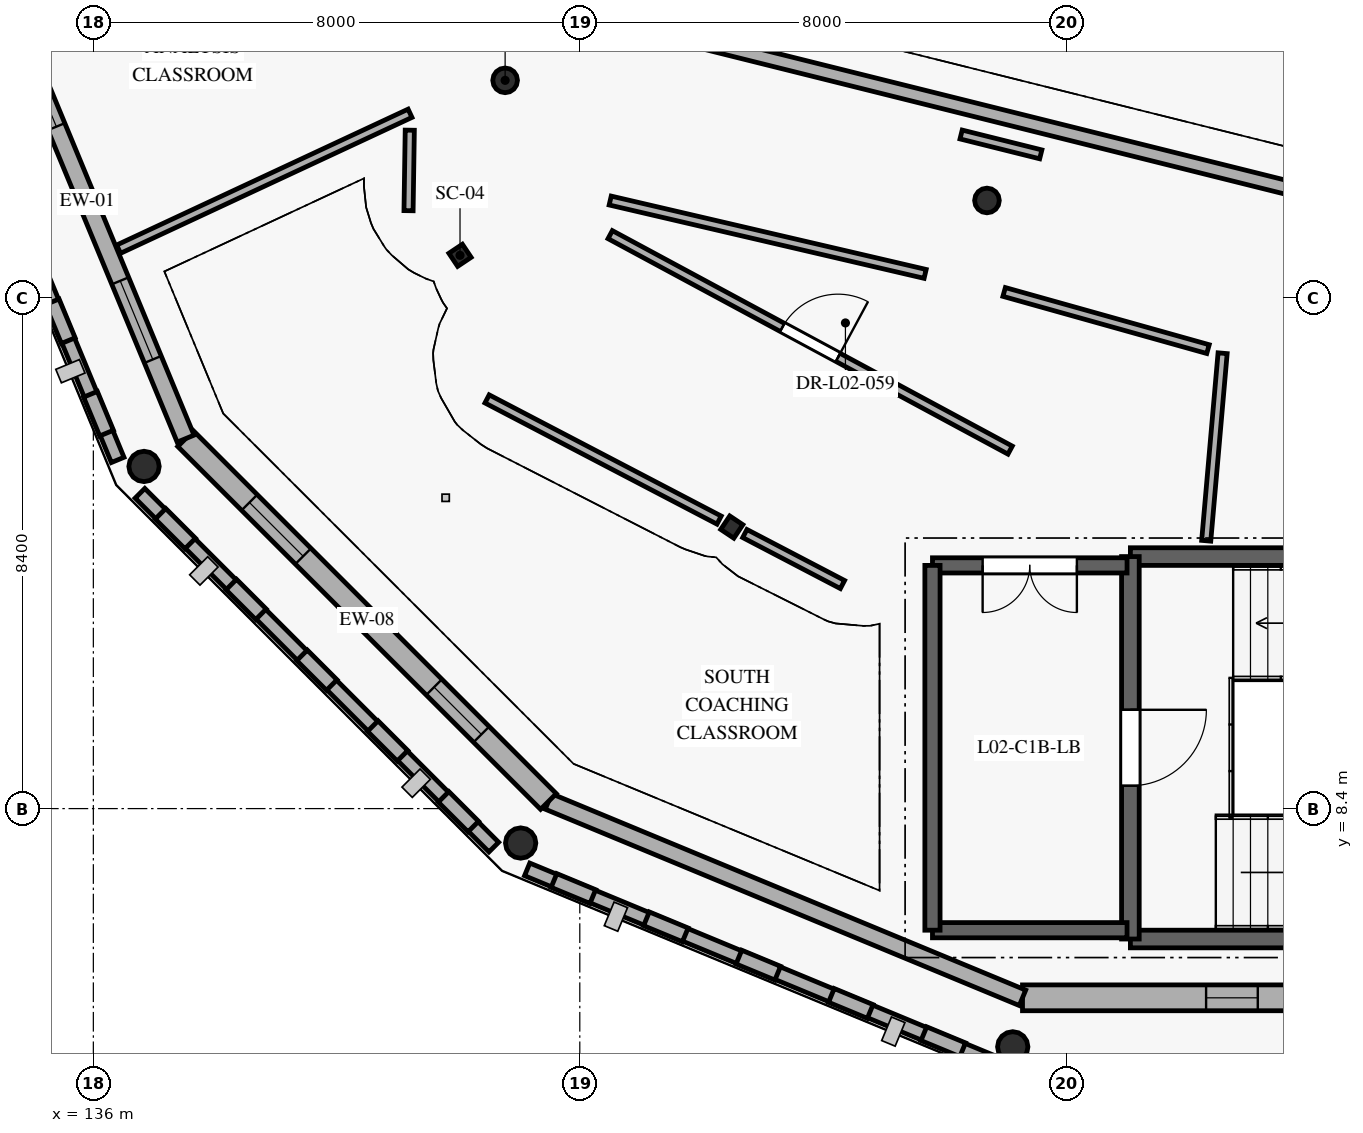
"""IFC4 building model, lengths in metres.
Left out: names, types, materials, properties, quantities, classifications, styles, units other than length and angle.
Written with IfcOpenShell. Run it as: python <this file> out.ifc"""

import sys

from ifc_helpers import new_model, si_unit, direction, frame, frame_2d, origin, origin_2d, place, context, subcontext, project, spatial, rectangle, circle, hollow_circle, i_section, extrude, element, fill, save


model = new_model("IFC4")
c1 = context("Model", 3, precision=1e-05, world=origin(), true_north=direction((0.0, 1.0)))
c2 = subcontext(c1, "Body", "Model", "MODEL_VIEW")
j1 = project(units=[si_unit("LENGTHUNIT", "METRE"), si_unit("PLANEANGLEUNIT", "RADIAN")], contexts=[c1])
p1 = place(None, origin())
s1 = spatial("IfcSite", under=j1, at=p1, CompositionType="ELEMENT")
p2 = place(p1, origin())
s2 = spatial("IfcBuilding", under=s1, at=p2, CompositionType="ELEMENT")
p3 = place(p2, frame((0.0, 0.0, 8.4)))
s3 = spatial("IfcBuildingStorey", under=s2, at=p3, CompositionType="ELEMENT", Elevation=8.4)
for number, where, z_axis, x_axis in (
    (1, (142.772, 20.377, 0.0), (0.0, 0.0, 1.0), (0.97, -0.242, 0.0)),
    (2, (150.696, 18.402, 0.0), (0.0, 0.0, 1.0), (0.97, -0.242, 0.0)),
):
    element("IfcColumn", number, at=place(p3, frame(where, z_axis=z_axis, x_axis=x_axis)), inside=s3, PredefinedType="COLUMN", context=c2, shape_type="SweptSolid", body=[
        extrude(hollow_circle(Radius=0.203, WallThickness=0.016, at=origin_2d()), origin(), (0.0, 0.0, 1.0), 4.2),
    ])
for number, where, z_axis, x_axis in (
    (3, (136.833, 14.027, 0.0), (0.0, 0.0, 1.0), (0.556, -0.831, 0.0)),
    (4, (143.027, 7.833, 0.0), (0.0, 0.0, 1.0), (0.831, -0.556, 0.0)),
    (5, (151.12, 4.481, 0.0), (0.0, 0.0, 1.0), (0.981, -0.195, 0.0)),
):
    element("IfcColumn", number, at=place(p3, frame(where, z_axis=z_axis, x_axis=x_axis)), inside=s3, PredefinedType="COLUMN", context=c2, shape_type="SweptSolid", body=[
        extrude(circle(Radius=0.25, at=origin_2d()), origin(), (0.0, 0.0, 1.0), 4.2),
    ])
for number, where, z_axis, x_axis in (
    (6, (142.03, 17.5, 0.0), (0.0, 0.0, 1.0), (0.556, -0.831, 0.0)),
    (7, (146.5, 13.03, 0.0), (0.0, 0.0, 1.0), (0.831, -0.556, 0.0)),
):
    element("IfcColumn", number, at=place(p3, frame(where, z_axis=z_axis, x_axis=x_axis)), inside=s3, PredefinedType="COLUMN", context=c2, shape_type="SweptSolid", body=[
        extrude(i_section(OverallWidth=0.259, OverallDepth=0.267, WebThickness=0.013, FlangeThickness=0.021, FilletRadius=0.013, at=origin_2d()), origin(), (0.0, 0.0, 1.0), 4.2),
    ])
p4 = place(p3, frame((159.719, 5.288, 0.0), z_axis=(0.0, 0.0, 1.0), x_axis=(-1.0, 0.0, 0.0)))
e8 = element("IfcWall", 8, at=p4, inside=s3, PredefinedType="SOLIDWALL", context=c2, shape_type="SweptSolid", body=[
    extrude(rectangle(XDim=8.438, YDim=0.425, at=frame_2d((4.219, 0.0))), origin(), (0.0, 0.0, 1.0), 3.94),
])
p5 = place(p4, frame((1.685, 0.0, 0.85)))
e9 = element("IfcOpeningElement", 9, at=p5, cuts=e8, PredefinedType="OPENING", context=c2, shape_type="SweptSolid", body=[
    extrude(rectangle(XDim=0.85, YDim=1.4, at=frame_2d((0.425, 0.7))), frame((0.0, 0.222, 0.0), z_axis=(0.0, -1.0, 0.0), x_axis=(1.0, 0.0, 0.0)), (0.0, 0.0, 1.0), 0.445),
])
p6 = place(p4, frame((4.569, 0.0, 0.85)))
e10 = element("IfcOpeningElement", 10, at=p6, cuts=e8, PredefinedType="OPENING", context=c2, shape_type="SweptSolid", body=[
    extrude(rectangle(XDim=0.85, YDim=1.4, at=frame_2d((0.425, 0.7))), frame((0.0, 0.222, 0.0), z_axis=(0.0, -1.0, 0.0), x_axis=(1.0, 0.0, 0.0)), (0.0, 0.0, 1.0), 0.445),
])
p7 = place(p3, frame((151.281, 5.288, 0.0), z_axis=(0.0, 0.0, 1.0), x_axis=(-0.923884604839, 0.382671186453, 0.0)))
e11 = element("IfcWall", 11, at=p7, inside=s3, PredefinedType="SOLIDWALL", context=c2, shape_type="SweptSolid", body=[
    extrude(rectangle(XDim=8.439, YDim=0.275, at=frame_2d((4.219, 0.0))), origin(), (0.0, 0.0, 1.0), 3.94),
])
p8 = place(p3, frame((143.484, 8.517, 0.0), z_axis=(0.0, 0.0, 1.0), x_axis=(-0.707106781187, 0.707106781187, 0.0)))
e12 = element("IfcWall", 12, at=p8, inside=s3, PredefinedType="SOLIDWALL", context=c2, shape_type="SweptSolid", body=[
    extrude(rectangle(XDim=8.439, YDim=0.365, at=frame_2d((4.219, 0.0))), origin(), (0.0, 0.0, 1.0), 3.94),
])
p9 = place(p8, frame((1.56, 0.0, 0.85)))
e13 = element("IfcOpeningElement", 13, at=p9, cuts=e12, PredefinedType="OPENING", context=c2, shape_type="SweptSolid", body=[
    extrude(rectangle(XDim=1.1, YDim=1.4, at=frame_2d((0.55, 0.7))), frame((0.0, 0.192, 0.0), z_axis=(0.0, -1.0, 0.0), x_axis=(1.0, 0.0, 0.0)), (0.0, 0.0, 1.0), 0.385),
])
p10 = place(p8, frame((5.704, 0.0, 0.85)))
e14 = element("IfcOpeningElement", 14, at=p10, cuts=e12, PredefinedType="OPENING", context=c2, shape_type="SweptSolid", body=[
    extrude(rectangle(XDim=1.25, YDim=1.4, at=frame_2d((0.625, 0.7))), frame((0.0, 0.192, 0.0), z_axis=(0.0, -1.0, 0.0), x_axis=(1.0, 0.0, 0.0)), (0.0, 0.0, 1.0), 0.385),
])
p11 = place(p3, frame((137.517, 14.484, 0.0), z_axis=(0.0, 0.0, 1.0), x_axis=(-0.382671186453, 0.923884604839, 0.0)))
e15 = element("IfcWall", 15, at=p11, inside=s3, PredefinedType="SOLIDWALL", context=c2, shape_type="SweptSolid", body=[
    extrude(rectangle(XDim=8.439, YDim=0.3, at=frame_2d((4.219, 0.0))), origin(), (0.0, 0.0, 1.0), 3.94),
])
p12 = place(p11, frame((1.41, 0.0, 0.85)))
e16 = element("IfcOpeningElement", 16, at=p12, cuts=e15, PredefinedType="OPENING", context=c2, shape_type="SweptSolid", body=[
    extrude(rectangle(XDim=1.4, YDim=1.4, at=frame_2d((0.7, 0.7))), frame((0.0, 0.16, 0.0), z_axis=(0.0, -1.0, 0.0), x_axis=(1.0, 0.0, 0.0)), (0.0, 0.0, 1.0), 0.32),
])
p13 = place(p11, frame((5.554, 0.0, 0.85)))
e17 = element("IfcOpeningElement", 17, at=p13, cuts=e15, PredefinedType="OPENING", context=c2, shape_type="SweptSolid", body=[
    extrude(rectangle(XDim=1.55, YDim=1.4, at=frame_2d((0.775, 0.7))), frame((0.0, 0.16, 0.0), z_axis=(0.0, -1.0, 0.0), x_axis=(1.0, 0.0, 0.0)), (0.0, 0.0, 1.0), 0.32),
])
p14 = place(p3, frame((133.251, 21.738, 0.0), z_axis=(0.0, 0.0, 1.0), x_axis=(0.382687155267, -0.923877990426, 0.0)))
e18 = element("IfcWall", 18, at=p14, inside=s3, PredefinedType="ELEMENTEDWALL", context=c2, shape_type="SweptSolid", body=[
    extrude(rectangle(XDim=8.23, YDim=0.225, at=frame_2d((4.115, 0.0))), origin(), (0.0, 0.0, 1.0), 1.09),
])
for number, where, z_axis, x_axis in (
    (19, (135.323, 16.735, 1.09), (0.0, 0.0, 1.0), (0.383, -0.924, 0.0)),
    (20, (135.953, 15.214, 1.09), (0.0, 0.0, 1.0), (0.383, -0.924, 0.0)),
):
    element("IfcWall", number, at=place(p3, frame(where, z_axis=z_axis, x_axis=x_axis)), inside=s3, PredefinedType="ELEMENTEDWALL", context=c2, shape_type="SweptSolid", body=[
        extrude(rectangle(XDim=0.691, YDim=0.245, at=frame_2d((0.345, 0.0))), origin(), (0.0, 0.0, 1.0), 2.85),
    ])
p15 = place(p3, frame((136.767, 13.586, 0.0), z_axis=(0.0, 0.0, 1.0), x_axis=(0.707106781187, -0.707106781187, 0.0)))
e21 = element("IfcWall", 21, at=p15, inside=s3, PredefinedType="ELEMENTEDWALL", context=c2, shape_type="SweptSolid", body=[
    extrude(rectangle(XDim=8.23, YDim=0.225, at=frame_2d((4.115, 0.0))), origin(), (0.0, 0.0, 1.0), 1.09),
])
p16 = place(p3, frame((137.104, 13.248, 1.09), z_axis=(0.0, 0.0, 1.0), x_axis=(0.707283403329, -0.706930114916, 0.0)))
e22 = element("IfcWall", 22, at=p16, inside=s3, PredefinedType="ELEMENTEDWALL", context=c2, shape_type="SweptSolid", body=[
    extrude(rectangle(XDim=0.691, YDim=0.245, at=frame_2d((0.346, 0.0))), origin(), (0.0, 0.0, 1.0), 2.85),
])
p17 = place(p3, frame((138.268, 12.084, 1.09), z_axis=(0.0, 0.0, 1.0), x_axis=(0.707106781187, -0.707106781187, 0.0)))
e23 = element("IfcWall", 23, at=p17, inside=s3, PredefinedType="ELEMENTEDWALL", context=c2, shape_type="SweptSolid", body=[
    extrude(rectangle(XDim=0.691, YDim=0.245, at=frame_2d((0.345, 0.0))), origin(), (0.0, 0.0, 1.0), 2.85),
])
p18 = place(p3, frame((139.432, 10.921, 1.09), z_axis=(0.0, 0.0, 1.0), x_axis=(0.707106781187, -0.707106781187, 0.0)))
e24 = element("IfcWall", 24, at=p18, inside=s3, PredefinedType="ELEMENTEDWALL", context=c2, shape_type="SweptSolid", body=[
    extrude(rectangle(XDim=0.691, YDim=0.245, at=frame_2d((0.346, 0.0))), origin(), (0.0, 0.0, 1.0), 2.85),
])
p19 = place(p3, frame((140.596, 9.757, 1.09), z_axis=(0.0, 0.0, 1.0), x_axis=(0.707106781187, -0.707106781187, 0.0)))
e25 = element("IfcWall", 25, at=p19, inside=s3, PredefinedType="ELEMENTEDWALL", context=c2, shape_type="SweptSolid", body=[
    extrude(rectangle(XDim=0.691, YDim=0.245, at=frame_2d((0.345, 0.0))), origin(), (0.0, 0.0, 1.0), 2.85),
])
p20 = place(p3, frame((141.76, 8.593, 1.09), z_axis=(0.0, 0.0, 1.0), x_axis=(0.706930114916, -0.707283403329, 0.0)))
e26 = element("IfcWall", 26, at=p20, inside=s3, PredefinedType="ELEMENTEDWALL", context=c2, shape_type="SweptSolid", body=[
    extrude(rectangle(XDim=0.691, YDim=0.245, at=frame_2d((0.346, 0.0))), origin(), (0.0, 0.0, 1.0), 2.85),
])
p21 = place(p3, frame((143.135, 7.4, 0.0), z_axis=(0.0, 0.0, 1.0), x_axis=(0.923877990426, -0.382687155267, 0.0)))
e27 = element("IfcWall", 27, at=p21, inside=s3, PredefinedType="ELEMENTEDWALL", context=c2, shape_type="SweptSolid", body=[
    extrude(rectangle(XDim=8.23, YDim=0.225, at=frame_2d((4.115, 0.0))), origin(), (0.0, 0.0, 1.0), 1.09),
])
for number, where, z_axis, x_axis in (
    (28, (143.576, 7.217, 1.09), (0.0, 0.0, 1.0), (0.924, -0.383, 0.0)),
    (29, (145.096, 6.587, 1.09), (0.0, 0.0, 1.0), (0.924, -0.383, 0.0)),
    (30, (146.617, 5.958, 1.09), (0.0, 0.0, 1.0), (0.924, -0.383, 0.0)),
):
    element("IfcWall", number, at=place(p3, frame(where, z_axis=z_axis, x_axis=x_axis)), inside=s3, PredefinedType="ELEMENTEDWALL", context=c2, shape_type="SweptSolid", body=[
        extrude(rectangle(XDim=0.691, YDim=0.245, at=frame_2d((0.345, 0.0))), origin(), (0.0, 0.0, 1.0), 2.85),
    ])
p22 = place(p3, frame((148.138, 5.328, 1.09), z_axis=(0.0, 0.0, 1.0), x_axis=(0.923848822335, -0.382757564877, 0.0)))
e31 = element("IfcWall", 31, at=p22, inside=s3, PredefinedType="ELEMENTEDWALL", context=c2, shape_type="SweptSolid", body=[
    extrude(rectangle(XDim=0.691, YDim=0.245, at=frame_2d((0.345, 0.0))), origin(), (0.0, 0.0, 1.0), 2.85),
])
p23 = place(p3, frame((149.658, 4.698, 1.09), z_axis=(0.0, 0.0, 1.0), x_axis=(0.92377564286, -0.382934147939, 0.0)))
e32 = element("IfcWall", 32, at=p23, inside=s3, PredefinedType="ELEMENTEDWALL", context=c2, shape_type="SweptSolid", body=[
    extrude(rectangle(XDim=0.691, YDim=0.245, at=frame_2d((0.346, 0.0))), origin(), (0.0, 0.0, 1.0), 2.85),
])
for number, where, z_axis, x_axis in (
    (33, (153.055, 6.255, 0.0), (0.0, 0.0, 1.0), (1.0, 0.0, 0.0)),
    (34, (159.945, 12.545, 0.0), (0.0, 0.0, 1.0), (-1.0, 0.0, 0.0)),
):
    element("IfcWall", number, at=place(p3, frame(where, z_axis=z_axis, x_axis=x_axis)), inside=s3, PredefinedType="SHEAR", context=c2, shape_type="SweptSolid", body=[
        extrude(rectangle(XDim=6.89, YDim=0.29, at=frame_2d((3.445, 0.0))), origin(), (0.0, 0.0, 1.0), 3.95),
    ])
p24 = place(p3, frame((153.055, 12.545, 0.0), z_axis=(0.0, 0.0, 1.0), x_axis=(0.0, -1.0, 0.0)))
e35 = element("IfcWall", 35, at=p24, inside=s3, PredefinedType="SHEAR", context=c2, shape_type="SweptSolid", body=[
    extrude(rectangle(XDim=6.29, YDim=0.29, at=frame_2d((3.145, 0.0))), origin(), (0.0, 0.0, 1.0), 3.95),
])
p25 = place(p24, frame((2.52, 0.0, 0.0)))
e36 = element("IfcOpeningElement", 36, at=p25, cuts=e35, PredefinedType="OPENING", context=c2, shape_type="SweptSolid", body=[
    extrude(rectangle(XDim=1.25, YDim=2.1, at=frame_2d((0.625, 1.05))), frame((0.0, 0.155, 0.0), z_axis=(0.0, -1.0, 0.0), x_axis=(1.0, 0.0, 0.0)), (0.0, 0.0, 1.0), 0.31),
])
p26 = place(p3, frame((149.8, 6.4, 0.0), z_axis=(0.0, 0.0, 1.0), x_axis=(1.0, 0.0, 0.0)))
e37 = element("IfcWall", 37, at=p26, inside=s3, PredefinedType="SHEAR", context=c2, shape_type="SweptSolid", body=[
    extrude(rectangle(XDim=3.2, YDim=0.25, at=frame_2d((1.6, 0.0))), origin(), (0.0, 0.0, 1.0), 3.95),
])
p27 = place(p3, frame((153.0, 12.4, 0.0), z_axis=(0.0, 0.0, 1.0), x_axis=(-1.0, 0.0, 0.0)))
e38 = element("IfcWall", 38, at=p27, inside=s3, PredefinedType="SHEAR", context=c2, shape_type="SweptSolid", body=[
    extrude(rectangle(XDim=3.2, YDim=0.25, at=frame_2d((1.6, 0.0))), origin(), (0.0, 0.0, 1.0), 3.95),
])
p28 = place(p27, frame((0.825, 0.0, 0.0)))
e39 = element("IfcOpeningElement", 39, at=p28, cuts=e38, PredefinedType="OPENING", context=c2, shape_type="SweptSolid", body=[
    extrude(rectangle(XDim=1.55, YDim=2.15, at=frame_2d((0.775, 1.075))), frame((0.0, 0.135, 0.0), z_axis=(0.0, -1.0, 0.0), x_axis=(1.0, 0.0, 0.0)), (0.0, 0.0, 1.0), 0.27),
])
p29 = place(p3, frame((149.8, 12.4, 0.0), z_axis=(0.0, 0.0, 1.0), x_axis=(0.0, -1.0, 0.0)))
e40 = element("IfcWall", 40, at=p29, inside=s3, PredefinedType="SHEAR", context=c2, shape_type="SweptSolid", body=[
    extrude(rectangle(XDim=6.0, YDim=0.25, at=frame_2d((3.0, 0.0))), origin(), (0.0, 0.0, 1.0), 3.95),
])
p30 = place(p3, frame((145.148, 21.228, 0.0), z_axis=(0.0, 0.0, 1.0), x_axis=(0.970296746874, -0.241917802169, 0.0)))
e41 = element("IfcWall", 41, at=p30, inside=s3, PredefinedType="PARTITIONING", context=c2, shape_type="SweptSolid", body=[
    extrude(rectangle(XDim=20.55, YDim=0.225, at=frame_2d((10.275, 0.0))), origin(), (0.0, 0.0, 1.0), 3.95),
])
p31 = place(p3, frame((141.208, 19.836, 0.0), z_axis=(0.0, 0.0, 1.0), x_axis=(-0.906301055213, -0.422632697882, 0.0)))
e42 = element("IfcWall", 42, at=p31, inside=s3, PredefinedType="PARTITIONING", context=c2, shape_type="SweptSolid", body=[
    extrude(rectangle(XDim=5.288, YDim=0.15, at=frame_2d((2.644, 0.0))), origin(), (0.0, 0.0, 1.0), 3.915),
])
p32 = place(p3, frame((154.302, 12.805, 0.0), z_axis=(0.0, 0.0, 1.0), x_axis=(0.08712978082, 0.996196969125, 0.0)))
e43 = element("IfcWall", 43, at=p32, inside=s3, PredefinedType="PARTITIONING", context=c2, shape_type="SweptSolid", body=[
    extrude(rectangle(XDim=3.096, YDim=0.15, at=frame_2d((1.548, 0.0))), origin(), (0.0, 0.0, 1.0), 3.915),
])
p33 = place(p3, frame((154.331, 15.957, 0.0), z_axis=(0.0, 0.0, 1.0), x_axis=(-0.96284886492, 0.270040854913, 0.0)))
e44 = element("IfcWall", 44, at=p33, inside=s3, PredefinedType="PARTITIONING", context=c2, shape_type="SweptSolid", body=[
    extrude(rectangle(XDim=3.482, YDim=0.15, at=frame_2d((1.741, 0.0))), origin(), (0.0, 0.0, 1.0), 3.915),
])
p34 = place(p3, frame((151.581, 19.16, 0.0), z_axis=(0.0, 0.0, 1.0), x_axis=(-0.970301811202, 0.241897488986, 0.0)))
e45 = element("IfcWall", 45, at=p34, inside=s3, PredefinedType="PARTITIONING", context=c2, shape_type="SweptSolid", body=[
    extrude(rectangle(XDim=1.35, YDim=0.15, at=frame_2d((0.675, 0.0))), origin(), (0.0, 0.0, 1.0), 3.915),
])
p35 = place(p3, frame((149.679, 17.194, 0.0), z_axis=(0.0, 0.0, 1.0), x_axis=(-0.973924106984, 0.226874048396, 0.0)))
e46 = element("IfcWall", 46, at=p35, inside=s3, PredefinedType="PARTITIONING", context=c2, shape_type="SweptSolid", body=[
    extrude(rectangle(XDim=5.318, YDim=0.15, at=frame_2d((2.659, 0.0))), origin(), (0.0, 0.0, 1.0), 3.915),
])
p36 = place(p3, frame((144.5, 17.84, 0.0), z_axis=(0.0, 0.0, 1.0), x_axis=(0.880350401945, -0.474323908101, 0.0)))
e47 = element("IfcWall", 47, at=p36, inside=s3, PredefinedType="PARTITIONING", context=c2, shape_type="SweptSolid", body=[
    extrude(rectangle(XDim=7.471, YDim=0.15, at=frame_2d((3.735, 0.0))), origin(), (0.0, 0.0, 1.0), 3.915),
])
p37 = place(p36, frame((3.216, 0.0, 0.0)))
e48 = element("IfcOpeningElement", 48, at=p37, cuts=e47, PredefinedType="OPENING", context=c2, shape_type="SweptSolid", body=[
    extrude(rectangle(XDim=1.04, YDim=2.1, at=frame_2d((0.52, 1.05))), frame((0.0, 0.085, 0.0), z_axis=(0.0, -1.0, 0.0), x_axis=(1.0, 0.0, 0.0)), (0.0, 0.0, 1.0), 0.17),
])
p38 = place(p3, frame((148.32, 12.085, 0.0), z_axis=(0.0, 0.0, 1.0), x_axis=(-0.886363704314, 0.462989615084, 0.0)))
e49 = element("IfcWall", 49, at=p38, inside=s3, PredefinedType="PARTITIONING", context=c2, shape_type="SweptSolid", body=[
    extrude(rectangle(XDim=1.812, YDim=0.15, at=frame_2d((0.906, 0.0))), origin(), (0.0, 0.0, 1.0), 3.915),
])
p39 = place(p3, frame((146.291, 13.145, 0.0), z_axis=(0.0, 0.0, 1.0), x_axis=(-0.886370383777, 0.462976827457, 0.0)))
e50 = element("IfcWall", 50, at=p39, inside=s3, PredefinedType="PARTITIONING", context=c2, shape_type="SweptSolid", body=[
    extrude(rectangle(XDim=4.305, YDim=0.15, at=frame_2d((2.153, 0.0))), origin(), (0.0, 0.0, 1.0), 3.384),
])
p40 = place(p3, frame((141.184, 18.234, 0.0), z_axis=(0.0, 0.0, 1.0), x_axis=(0.015300568579, 0.999882939449, 0.0)))
e51 = element("IfcWall", 51, at=p40, inside=s3, PredefinedType="PARTITIONING", context=c2, shape_type="SweptSolid", body=[
    extrude(rectangle(XDim=1.324, YDim=0.15, at=frame_2d((0.662, 0.0))), origin(), (0.0, 0.0, 1.0), 3.915),
])
p41 = place(p6, origin())
e52 = element("IfcWindow", 52, at=p41, inside=s3, PartitioningType="SINGLE_PANEL", PredefinedType="WINDOW", context=c2, shape_type="SweptSolid", body=[
    extrude(rectangle(XDim=0.85, YDim=1.4, at=frame_2d((0.425, 0.7))), frame((0.0, 0.03, 0.0), z_axis=(0.0, -1.0, 0.0), x_axis=(1.0, 0.0, 0.0)), (0.0, 0.0, 1.0), 0.06),
])
fill(e10, e52)
p42 = place(p9, origin())
e53 = element("IfcWindow", 53, at=p42, inside=s3, PartitioningType="SINGLE_PANEL", PredefinedType="WINDOW", context=c2, shape_type="SweptSolid", body=[
    extrude(rectangle(XDim=1.1, YDim=1.4, at=frame_2d((0.55, 0.7))), frame((0.0, 0.03, 0.0), z_axis=(0.0, -1.0, 0.0), x_axis=(1.0, 0.0, 0.0)), (0.0, 0.0, 1.0), 0.06),
])
fill(e13, e53)
p43 = place(p10, origin())
e54 = element("IfcWindow", 54, at=p43, inside=s3, PartitioningType="SINGLE_PANEL", PredefinedType="WINDOW", context=c2, shape_type="SweptSolid", body=[
    extrude(rectangle(XDim=1.25, YDim=1.4, at=frame_2d((0.625, 0.7))), frame((0.0, 0.03, 0.0), z_axis=(0.0, -1.0, 0.0), x_axis=(1.0, 0.0, 0.0)), (0.0, 0.0, 1.0), 0.06),
])
fill(e14, e54)
p44 = place(p12, origin())
e55 = element("IfcWindow", 55, at=p44, inside=s3, PartitioningType="SINGLE_PANEL", PredefinedType="WINDOW", context=c2, shape_type="SweptSolid", body=[
    extrude(rectangle(XDim=1.4, YDim=1.4, at=frame_2d((0.7, 0.7))), frame((0.0, 0.03, 0.0), z_axis=(0.0, -1.0, 0.0), x_axis=(1.0, 0.0, 0.0)), (0.0, 0.0, 1.0), 0.06),
])
fill(e16, e55)
p45 = place(p13, origin())
e56 = element("IfcWindow", 56, at=p45, inside=s3, PartitioningType="SINGLE_PANEL", PredefinedType="WINDOW", context=c2, shape_type="SweptSolid", body=[
    extrude(rectangle(XDim=1.55, YDim=1.4, at=frame_2d((0.775, 0.7))), frame((0.0, 0.03, 0.0), z_axis=(0.0, -1.0, 0.0), x_axis=(1.0, 0.0, 0.0)), (0.0, 0.0, 1.0), 0.06),
])
fill(e17, e56)
p46 = place(p25, origin())
e57 = element("IfcDoor", 57, at=p46, inside=s3, OperationType="SINGLE_SWING_LEFT", PredefinedType="DOOR", context=c2, shape_type="SweptSolid", body=[
    extrude(rectangle(XDim=1.25, YDim=2.1, at=frame_2d((0.625, 1.05))), frame((0.0, 0.025, 0.0), z_axis=(0.0, -1.0, 0.0), x_axis=(1.0, 0.0, 0.0)), (0.0, 0.0, 1.0), 0.05),
])
fill(e36, e57)
p47 = place(p28, origin())
e58 = element("IfcDoor", 58, at=p47, inside=s3, OperationType="DOUBLE_DOOR_SINGLE_SWING", PredefinedType="DOOR", context=c2, shape_type="SweptSolid", body=[
    extrude(rectangle(XDim=1.55, YDim=2.15, at=frame_2d((0.775, 1.075))), frame((0.0, 0.025, 0.0), z_axis=(0.0, -1.0, 0.0), x_axis=(1.0, 0.0, 0.0)), (0.0, 0.0, 1.0), 0.05),
])
fill(e39, e58)
p48 = place(p37, origin())
e59 = element("IfcDoor", 59, at=p48, inside=s3, OperationType="SINGLE_SWING_RIGHT", PredefinedType="DOOR", context=c2, shape_type="SweptSolid", body=[
    extrude(rectangle(XDim=1.04, YDim=2.1, at=frame_2d((0.52, 1.05))), frame((0.0, 0.025, 0.0), z_axis=(0.0, -1.0, 0.0), x_axis=(1.0, 0.0, 0.0)), (0.0, 0.0, 1.0), 0.05),
])
fill(e48, e59)
save(model, sys.argv[1])
